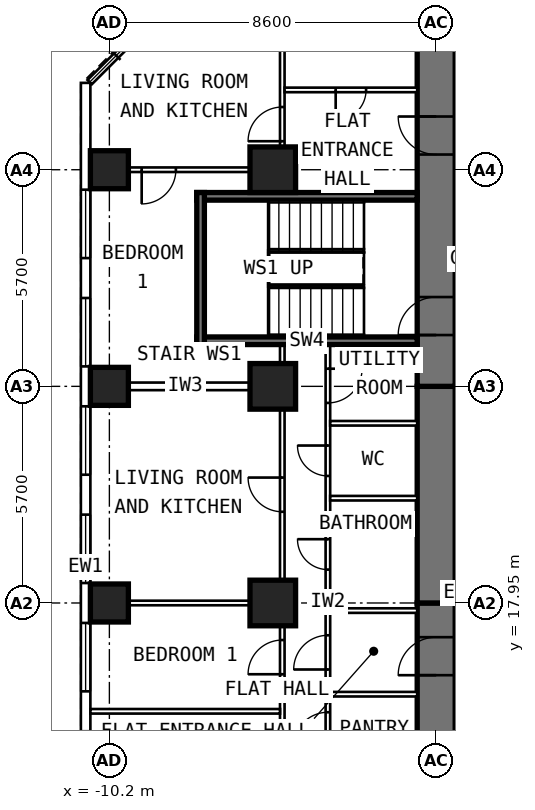
"""IFC4 building model, lengths in metres.
Left out: names, types, materials, properties, quantities, classifications, styles, units other than length and angle.
Written with IfcOpenShell. Run it as: python <this file> out.ifc"""

import sys

from ifc_helpers import new_model, si_unit, direction, frame, frame_2d, origin, origin_2d, place, context, subcontext, project, spatial, rectangle, extrude, element, fill, save


model = new_model("IFC4")
c1 = context("Model", 3, precision=1e-05, world=origin(), true_north=direction((0.0, 1.0)))
c2 = subcontext(c1, "Body", "Model", "MODEL_VIEW")
j1 = project(units=[si_unit("LENGTHUNIT", "METRE"), si_unit("PLANEANGLEUNIT", "RADIAN")], contexts=[c1])
p1 = place(None, origin())
s1 = spatial("IfcSite", under=j1, at=p1, CompositionType="ELEMENT")
p2 = place(p1, origin())
s2 = spatial("IfcBuilding", under=s1, at=p2, CompositionType="ELEMENT")
p3 = place(p2, frame((0.0, 0.0, 50.2)))
s3 = spatial("IfcBuildingStorey", under=s2, at=p3, CompositionType="ELEMENT", Elevation=50.2)
for number, where, z_axis, x_axis in (
    (1, (-10.2, 17.95, 0.0), (0.0, 0.0, 1.0), (0.0, 1.0, 0.0)),
    (2, (-10.2, 23.65, 0.0), (0.0, 0.0, 1.0), (0.0, 1.0, 0.0)),
    (3, (-10.2, 29.35, 0.0), (0.0, 0.0, 1.0), (0.0, 1.0, 0.0)),
):
    element("IfcColumn", number, at=place(p3, frame(where, z_axis=z_axis, x_axis=x_axis)), inside=s3, PredefinedType="COLUMN", context=c2, shape_type="SweptSolid", body=[
        extrude(rectangle(XDim=1.0, YDim=1.0, at=origin_2d()), origin(), (0.0, 0.0, 1.0), 3.6),
    ])
for number, where, z_axis, x_axis in (
    (4, (-5.9, 17.95, 0.0), (0.0, 0.0, 1.0), (0.0, 1.0, 0.0)),
    (5, (-5.9, 23.65, 0.0), (0.0, 0.0, 1.0), (0.0, 1.0, 0.0)),
    (6, (-5.9, 29.35, 0.0), (0.0, 0.0, 1.0), (0.0, 1.0, 0.0)),
):
    element("IfcColumn", number, at=place(p3, frame(where, z_axis=z_axis, x_axis=x_axis)), inside=s3, PredefinedType="COLUMN", context=c2, shape_type="SweptSolid", body=[
        extrude(rectangle(XDim=1.2, YDim=1.2, at=origin_2d()), origin(), (0.0, 0.0, 1.0), 3.6),
    ])
p4 = place(p3, frame((-1.6, 9.6, 0.0), z_axis=(0.0, 0.0, 1.0), x_axis=(0.0, 1.0, 0.0)))
e7 = element("IfcWall", 7, at=p4, inside=s3, PredefinedType="SHEAR", context=c2, shape_type="SweptSolid", body=[
    extrude(rectangle(XDim=8.35, YDim=1.0, at=frame_2d((4.175, 0.0))), origin(), (0.0, 0.0, 1.0), 3.6),
])
p5 = place(p4, frame((6.45, 0.0, 0.0)))
e8 = element("IfcOpeningElement", 8, at=p5, cuts=e7, PredefinedType="OPENING", context=c2, shape_type="SweptSolid", body=[
    extrude(rectangle(XDim=1.0, YDim=2.1, at=frame_2d((0.5, 1.05))), frame((0.0, 0.512, 0.0), z_axis=(0.0, -1.0, 0.0), x_axis=(1.0, 0.0, 0.0)), (0.0, 0.0, 1.0), 1.024),
])
p6 = place(p3, frame((-1.6, 17.95, 0.0), z_axis=(0.0, 0.0, 1.0), x_axis=(0.0, 1.0, 0.0)))
e9 = element("IfcWall", 9, at=p6, inside=s3, PredefinedType="SHEAR", context=c2, shape_type="SweptSolid", body=[
    extrude(rectangle(XDim=5.7, YDim=1.0, at=frame_2d((2.85, 0.0))), origin(), (0.0, 0.0, 1.0), 3.6),
])
p7 = place(p3, frame((-1.6, 23.65, 0.0), z_axis=(0.0, 0.0, 1.0), x_axis=(0.0, 1.0, 0.0)))
e10 = element("IfcWall", 10, at=p7, inside=s3, PredefinedType="SHEAR", context=c2, shape_type="SweptSolid", body=[
    extrude(rectangle(XDim=10.745, YDim=1.0, at=frame_2d((5.373, 0.0))), origin(), (0.0, 0.0, 1.0), 3.6),
])
p8 = place(p7, frame((6.1, 0.0, 0.0)))
e11 = element("IfcOpeningElement", 11, at=p8, cuts=e10, PredefinedType="OPENING", context=c2, shape_type="SweptSolid", body=[
    extrude(rectangle(XDim=1.0, YDim=2.1, at=frame_2d((0.5, 1.05))), frame((0.0, 0.512, 0.0), z_axis=(0.0, -1.0, 0.0), x_axis=(1.0, 0.0, 0.0)), (0.0, 0.0, 1.0), 1.024),
])
p9 = place(p7, frame((1.35, 0.0, 0.0)))
e12 = element("IfcOpeningElement", 12, at=p9, cuts=e10, PredefinedType="OPENING", context=c2, shape_type="SweptSolid", body=[
    extrude(rectangle(XDim=1.0, YDim=2.1, at=frame_2d((0.5, 1.05))), frame((0.0, 0.512, 0.0), z_axis=(0.0, -1.0, 0.0), x_axis=(1.0, 0.0, 0.0)), (0.0, 0.0, 1.0), 1.024),
])
p10 = place(p3, frame((-10.825, 6.148, 0.0), z_axis=(0.0, 0.0, 1.0), x_axis=(0.0, 1.0, 0.0)))
e13 = element("IfcWall", 13, at=p10, inside=s3, PredefinedType="SOLIDWALL", context=c2, shape_type="SweptSolid", body=[
    extrude(rectangle(XDim=25.487, YDim=0.25, at=frame_2d((12.744, 0.0))), origin(), (0.0, 0.0, 1.0), 3.35),
])
p11 = place(p10, frame((0.927, 0.0, 0.8)))
e14 = element("IfcOpeningElement", 14, at=p11, cuts=e13, PredefinedType="OPENING", context=c2, shape_type="SweptSolid", body=[
    extrude(rectangle(XDim=1.8, YDim=1.8, at=frame_2d((0.9, 0.9))), frame((0.0, 0.137, 0.0), z_axis=(0.0, -1.0, 0.0), x_axis=(1.0, 0.0, 0.0)), (0.0, 0.0, 1.0), 0.274),
])
p12 = place(p10, frame((3.777, 0.0, 0.8)))
e15 = element("IfcOpeningElement", 15, at=p12, cuts=e13, PredefinedType="OPENING", context=c2, shape_type="SweptSolid", body=[
    extrude(rectangle(XDim=1.8, YDim=1.8, at=frame_2d((0.9, 0.9))), frame((0.0, 0.137, 0.0), z_axis=(0.0, -1.0, 0.0), x_axis=(1.0, 0.0, 0.0)), (0.0, 0.0, 1.0), 0.274),
])
p13 = place(p10, frame((6.627, 0.0, 0.8)))
e16 = element("IfcOpeningElement", 16, at=p13, cuts=e13, PredefinedType="OPENING", context=c2, shape_type="SweptSolid", body=[
    extrude(rectangle(XDim=1.8, YDim=1.8, at=frame_2d((0.9, 0.9))), frame((0.0, 0.137, 0.0), z_axis=(0.0, -1.0, 0.0), x_axis=(1.0, 0.0, 0.0)), (0.0, 0.0, 1.0), 0.274),
])
p14 = place(p10, frame((9.477, 0.0, 0.8)))
e17 = element("IfcOpeningElement", 17, at=p14, cuts=e13, PredefinedType="OPENING", context=c2, shape_type="SweptSolid", body=[
    extrude(rectangle(XDim=1.8, YDim=1.8, at=frame_2d((0.9, 0.9))), frame((0.0, 0.137, 0.0), z_axis=(0.0, -1.0, 0.0), x_axis=(1.0, 0.0, 0.0)), (0.0, 0.0, 1.0), 0.274),
])
p15 = place(p10, frame((12.327, 0.0, 0.8)))
e18 = element("IfcOpeningElement", 18, at=p15, cuts=e13, PredefinedType="OPENING", context=c2, shape_type="SweptSolid", body=[
    extrude(rectangle(XDim=1.8, YDim=1.8, at=frame_2d((0.9, 0.9))), frame((0.0, 0.137, 0.0), z_axis=(0.0, -1.0, 0.0), x_axis=(1.0, 0.0, 0.0)), (0.0, 0.0, 1.0), 0.274),
])
p16 = place(p10, frame((15.177, 0.0, 0.8)))
e19 = element("IfcOpeningElement", 19, at=p16, cuts=e13, PredefinedType="OPENING", context=c2, shape_type="SweptSolid", body=[
    extrude(rectangle(XDim=1.8, YDim=1.8, at=frame_2d((0.9, 0.9))), frame((0.0, 0.137, 0.0), z_axis=(0.0, -1.0, 0.0), x_axis=(1.0, 0.0, 0.0)), (0.0, 0.0, 1.0), 0.274),
])
p17 = place(p10, frame((18.027, 0.0, 0.8)))
e20 = element("IfcOpeningElement", 20, at=p17, cuts=e13, PredefinedType="OPENING", context=c2, shape_type="SweptSolid", body=[
    extrude(rectangle(XDim=1.8, YDim=1.8, at=frame_2d((0.9, 0.9))), frame((0.0, 0.137, 0.0), z_axis=(0.0, -1.0, 0.0), x_axis=(1.0, 0.0, 0.0)), (0.0, 0.0, 1.0), 0.274),
])
p18 = place(p10, frame((20.877, 0.0, 0.8)))
e21 = element("IfcOpeningElement", 21, at=p18, cuts=e13, PredefinedType="OPENING", context=c2, shape_type="SweptSolid", body=[
    extrude(rectangle(XDim=1.8, YDim=1.8, at=frame_2d((0.9, 0.9))), frame((0.0, 0.137, 0.0), z_axis=(0.0, -1.0, 0.0), x_axis=(1.0, 0.0, 0.0)), (0.0, 0.0, 1.0), 0.274),
])
p19 = place(p3, frame((-4.45, 10.1, 0.0), z_axis=(0.0, 0.0, 1.0), x_axis=(0.0, 1.0, 0.0)))
e22 = element("IfcWall", 22, at=p19, inside=s3, PredefinedType="PARTITIONING", context=c2, shape_type="SweptSolid", body=[
    extrude(rectangle(XDim=14.65, YDim=0.12, at=frame_2d((7.325, 0.0))), origin(), (0.0, 0.0, 1.0), 3.35),
])
p20 = place(p19, frame((0.375, 0.0, 0.0)))
e23 = element("IfcOpeningElement", 23, at=p20, cuts=e22, PredefinedType="OPENING", context=c2, shape_type="SweptSolid", body=[
    extrude(rectangle(XDim=0.9, YDim=2.1, at=frame_2d((0.45, 1.05))), frame((0.0, 0.072, 0.0), z_axis=(0.0, -1.0, 0.0), x_axis=(1.0, 0.0, 0.0)), (0.0, 0.0, 1.0), 0.144),
])
p21 = place(p19, frame((2.275, 0.0, 0.0)))
e24 = element("IfcOpeningElement", 24, at=p21, cuts=e22, PredefinedType="OPENING", context=c2, shape_type="SweptSolid", body=[
    extrude(rectangle(XDim=0.8, YDim=2.1, at=frame_2d((0.4, 1.05))), frame((0.0, 0.072, 0.0), z_axis=(0.0, -1.0, 0.0), x_axis=(1.0, 0.0, 0.0)), (0.0, 0.0, 1.0), 0.144),
])
p22 = place(p19, frame((4.075, 0.0, 0.0)))
e25 = element("IfcOpeningElement", 25, at=p22, cuts=e22, PredefinedType="OPENING", context=c2, shape_type="SweptSolid", body=[
    extrude(rectangle(XDim=0.9, YDim=2.1, at=frame_2d((0.45, 1.05))), frame((0.0, 0.072, 0.0), z_axis=(0.0, -1.0, 0.0), x_axis=(1.0, 0.0, 0.0)), (0.0, 0.0, 1.0), 0.144),
])
p23 = place(p19, frame((6.1, 0.0, 0.0)))
e26 = element("IfcOpeningElement", 26, at=p23, cuts=e22, PredefinedType="OPENING", context=c2, shape_type="SweptSolid", body=[
    extrude(rectangle(XDim=0.9, YDim=2.1, at=frame_2d((0.45, 1.05))), frame((0.0, 0.072, 0.0), z_axis=(0.0, -1.0, 0.0), x_axis=(1.0, 0.0, 0.0)), (0.0, 0.0, 1.0), 0.144),
])
p24 = place(p19, frame((8.729, 0.0, 0.0)))
e27 = element("IfcOpeningElement", 27, at=p24, cuts=e22, PredefinedType="OPENING", context=c2, shape_type="SweptSolid", body=[
    extrude(rectangle(XDim=0.8, YDim=2.1, at=frame_2d((0.4, 1.05))), frame((0.0, 0.072, 0.0), z_axis=(0.0, -1.0, 0.0), x_axis=(1.0, 0.0, 0.0)), (0.0, 0.0, 1.0), 0.144),
])
p25 = place(p19, frame((11.193, 0.0, 0.0)))
e28 = element("IfcOpeningElement", 28, at=p25, cuts=e22, PredefinedType="OPENING", context=c2, shape_type="SweptSolid", body=[
    extrude(rectangle(XDim=0.8, YDim=2.1, at=frame_2d((0.4, 1.05))), frame((0.0, 0.072, 0.0), z_axis=(0.0, -1.0, 0.0), x_axis=(1.0, 0.0, 0.0)), (0.0, 0.0, 1.0), 0.144),
])
p26 = place(p19, frame((13.114, 0.0, 0.0)))
e29 = element("IfcOpeningElement", 29, at=p26, cuts=e22, PredefinedType="OPENING", context=c2, shape_type="SweptSolid", body=[
    extrude(rectangle(XDim=0.9, YDim=2.1, at=frame_2d((0.45, 1.05))), frame((0.0, 0.072, 0.0), z_axis=(0.0, -1.0, 0.0), x_axis=(1.0, 0.0, 0.0)), (0.0, 0.0, 1.0), 0.144),
])
p27 = place(p3, frame((-5.65, 9.6, 0.0), z_axis=(0.0, 0.0, 1.0), x_axis=(0.0, 1.0, 0.0)))
e30 = element("IfcWall", 30, at=p27, inside=s3, PredefinedType="PARTITIONING", context=c2, shape_type="SweptSolid", body=[
    extrude(rectangle(XDim=15.15, YDim=0.12, at=frame_2d((7.575, 0.0))), origin(), (0.0, 0.0, 1.0), 3.35),
])
p28 = place(p27, frame((1.0, 0.0, 0.0)))
e31 = element("IfcOpeningElement", 31, at=p28, cuts=e30, PredefinedType="OPENING", context=c2, shape_type="SweptSolid", body=[
    extrude(rectangle(XDim=0.9, YDim=2.1, at=frame_2d((0.45, 1.05))), frame((0.0, 0.072, 0.0), z_axis=(0.0, -1.0, 0.0), x_axis=(1.0, 0.0, 0.0)), (0.0, 0.0, 1.0), 0.144),
])
p29 = place(p27, frame((3.625, 0.0, 0.0)))
e32 = element("IfcOpeningElement", 32, at=p29, cuts=e30, PredefinedType="OPENING", context=c2, shape_type="SweptSolid", body=[
    extrude(rectangle(XDim=0.9, YDim=2.1, at=frame_2d((0.45, 1.05))), frame((0.0, 0.072, 0.0), z_axis=(0.0, -1.0, 0.0), x_axis=(1.0, 0.0, 0.0)), (0.0, 0.0, 1.0), 0.144),
])
p30 = place(p27, frame((6.475, 0.0, 0.0)))
e33 = element("IfcOpeningElement", 33, at=p30, cuts=e30, PredefinedType="OPENING", context=c2, shape_type="SweptSolid", body=[
    extrude(rectangle(XDim=0.9, YDim=2.1, at=frame_2d((0.45, 1.05))), frame((0.0, 0.072, 0.0), z_axis=(0.0, -1.0, 0.0), x_axis=(1.0, 0.0, 0.0)), (0.0, 0.0, 1.0), 0.144),
])
p31 = place(p27, frame((10.75, 0.0, 0.0)))
e34 = element("IfcOpeningElement", 34, at=p31, cuts=e30, PredefinedType="OPENING", context=c2, shape_type="SweptSolid", body=[
    extrude(rectangle(XDim=0.9, YDim=2.1, at=frame_2d((0.45, 1.05))), frame((0.0, 0.072, 0.0), z_axis=(0.0, -1.0, 0.0), x_axis=(1.0, 0.0, 0.0)), (0.0, 0.0, 1.0), 0.144),
])
p32 = place(p3, frame((-5.71, 15.1, 0.0), z_axis=(0.0, 0.0, 1.0), x_axis=(-1.0, 0.0, 0.0)))
e35 = element("IfcWall", 35, at=p32, inside=s3, PredefinedType="PARTITIONING", context=c2, shape_type="SweptSolid", body=[
    extrude(rectangle(XDim=4.99, YDim=0.12, at=frame_2d((2.495, 0.0))), origin(), (0.0, 0.0, 1.0), 3.35),
])
p33 = place(p3, frame((-5.71, 17.95, 0.0), z_axis=(0.0, 0.0, 1.0), x_axis=(-1.0, 0.0, 0.0)))
e36 = element("IfcWall", 36, at=p33, inside=s3, PredefinedType="PARTITIONING", context=c2, shape_type="SweptSolid", body=[
    extrude(rectangle(XDim=4.99, YDim=0.12, at=frame_2d((2.495, 0.0))), origin(), (0.0, 0.0, 1.0), 2.45),
])
p34 = place(p3, frame((-2.1, 15.55, 0.0), z_axis=(0.0, 0.0, 1.0), x_axis=(-1.0, 0.0, 0.0)))
e37 = element("IfcWall", 37, at=p34, inside=s3, PredefinedType="PARTITIONING", context=c2, shape_type="SweptSolid", body=[
    extrude(rectangle(XDim=2.29, YDim=0.12, at=frame_2d((1.145, 0.0))), origin(), (0.0, 0.0, 1.0), 3.35),
])
p35 = place(p3, frame((-2.1, 17.75, 0.0), z_axis=(0.0, 0.0, 1.0), x_axis=(-1.0, 0.0, 0.0)))
e38 = element("IfcWall", 38, at=p35, inside=s3, PredefinedType="PARTITIONING", context=c2, shape_type="SweptSolid", body=[
    extrude(rectangle(XDim=2.29, YDim=0.12, at=frame_2d((1.145, 0.0))), origin(), (0.0, 0.0, 1.0), 2.45),
])
for number, where, z_axis, x_axis in (
    (39, (-2.1, 20.707, 0.0), (0.0, 0.0, 1.0), (-1.0, 0.0, 0.0)),
    (40, (-2.1, 22.678, 0.0), (0.0, 0.0, 1.0), (-1.0, 0.0, 0.0)),
):
    element("IfcWall", number, at=place(p3, frame(where, z_axis=z_axis, x_axis=x_axis)), inside=s3, PredefinedType="PARTITIONING", context=c2, shape_type="SweptSolid", body=[
        extrude(rectangle(XDim=2.29, YDim=0.12, at=frame_2d((1.145, 0.0))), origin(), (0.0, 0.0, 1.0), 3.35),
    ])
p36 = place(p3, frame((-5.71, 23.65, 0.0), z_axis=(0.0, 0.0, 1.0), x_axis=(-1.0, 0.0, 0.0)))
e41 = element("IfcWall", 41, at=p36, inside=s3, PredefinedType="PARTITIONING", context=c2, shape_type="SweptSolid", body=[
    extrude(rectangle(XDim=4.99, YDim=0.2, at=frame_2d((2.495, 0.0))), origin(), (0.0, 0.0, 1.0), 2.45),
])
p37 = place(p3, frame((-5.71, 29.35, 0.0), z_axis=(0.0, 0.0, 1.0), x_axis=(-1.0, 0.0, 0.0)))
e42 = element("IfcWall", 42, at=p37, inside=s3, PredefinedType="PARTITIONING", context=c2, shape_type="SweptSolid", body=[
    extrude(rectangle(XDim=4.99, YDim=0.12, at=frame_2d((2.495, 0.0))), origin(), (0.0, 0.0, 1.0), 2.45),
])
p38 = place(p37, frame((2.74, 0.0, 0.0)))
e43 = element("IfcOpeningElement", 43, at=p38, cuts=e42, PredefinedType="OPENING", context=c2, shape_type="SweptSolid", body=[
    extrude(rectangle(XDim=0.9, YDim=2.1, at=frame_2d((0.45, 1.05))), frame((0.0, 0.072, 0.0), z_axis=(0.0, -1.0, 0.0), x_axis=(1.0, 0.0, 0.0)), (0.0, 0.0, 1.0), 0.144),
])
p39 = place(p3, frame((-5.65, 28.95, 0.0), z_axis=(0.0, 0.0, 1.0), x_axis=(0.0, 1.0, 0.0)))
e44 = element("IfcWall", 44, at=p39, inside=s3, PredefinedType="PARTITIONING", context=c2, shape_type="SweptSolid", body=[
    extrude(rectangle(XDim=5.445, YDim=0.12, at=frame_2d((2.723, 0.0))), origin(), (0.0, 0.0, 1.0), 3.35),
])
p40 = place(p39, frame((1.15, 0.0, 0.0)))
e45 = element("IfcOpeningElement", 45, at=p40, cuts=e44, PredefinedType="OPENING", context=c2, shape_type="SweptSolid", body=[
    extrude(rectangle(XDim=0.9, YDim=2.1, at=frame_2d((0.45, 1.05))), frame((0.0, 0.072, 0.0), z_axis=(0.0, -1.0, 0.0), x_axis=(1.0, 0.0, 0.0)), (0.0, 0.0, 1.0), 0.144),
])
p41 = place(p3, frame((-2.1, 31.45, 0.0), z_axis=(0.0, 0.0, 1.0), x_axis=(-1.0, 0.0, 0.0)))
e46 = element("IfcWall", 46, at=p41, inside=s3, PredefinedType="PARTITIONING", context=c2, shape_type="SweptSolid", body=[
    extrude(rectangle(XDim=3.49, YDim=0.12, at=frame_2d((1.745, 0.0))), origin(), (0.0, 0.0, 1.0), 3.35),
])
p42 = place(p41, frame((1.345, 0.0, 0.0)))
e47 = element("IfcOpeningElement", 47, at=p42, cuts=e46, PredefinedType="OPENING", context=c2, shape_type="SweptSolid", body=[
    extrude(rectangle(XDim=0.8, YDim=2.1, at=frame_2d((0.4, 1.05))), frame((0.0, 0.072, 0.0), z_axis=(0.0, -1.0, 0.0), x_axis=(1.0, 0.0, 0.0)), (0.0, 0.0, 1.0), 0.144),
])
for number, where, z_axis, x_axis in (
    (48, (-2.1, 24.85, 0.0), (0.0, 0.0, 1.0), (-1.0, 0.0, 0.0)),
    (49, (-2.1, 28.65, 0.0), (0.0, 0.0, 1.0), (-1.0, 0.0, 0.0)),
):
    element("IfcWall", number, at=place(p3, frame(where, z_axis=z_axis, x_axis=x_axis)), inside=s3, PredefinedType="SHEAR", context=c2, shape_type="SweptSolid", body=[
        extrude(rectangle(XDim=5.8, YDim=0.2, at=frame_2d((2.9, 0.0))), origin(), (0.0, 0.0, 1.0), 3.33),
    ])
p43 = place(p3, frame((-7.8, 24.75, 0.0), z_axis=(0.0, 0.0, 1.0), x_axis=(0.0, 1.0, 0.0)))
e50 = element("IfcWall", 50, at=p43, inside=s3, PredefinedType="SHEAR", context=c2, shape_type="SweptSolid", body=[
    extrude(rectangle(XDim=4.0, YDim=0.2, at=frame_2d((2.0, 0.0))), origin(), (0.0, 0.0, 1.0), 3.33),
])
p44 = place(p14, origin())
e51 = element("IfcWindow", 51, at=p44, inside=s3, PartitioningType="SINGLE_PANEL", PredefinedType="WINDOW", context=c2, shape_type="SweptSolid", body=[
    extrude(rectangle(XDim=1.8, YDim=1.8, at=frame_2d((0.9, 0.9))), frame((0.0, 0.03, 0.0), z_axis=(0.0, -1.0, 0.0), x_axis=(1.0, 0.0, 0.0)), (0.0, 0.0, 1.0), 0.06),
])
fill(e17, e51)
p45 = place(p15, origin())
e52 = element("IfcWindow", 52, at=p45, inside=s3, PartitioningType="SINGLE_PANEL", PredefinedType="WINDOW", context=c2, shape_type="SweptSolid", body=[
    extrude(rectangle(XDim=1.8, YDim=1.8, at=frame_2d((0.9, 0.9))), frame((0.0, 0.03, 0.0), z_axis=(0.0, -1.0, 0.0), x_axis=(1.0, 0.0, 0.0)), (0.0, 0.0, 1.0), 0.06),
])
fill(e18, e52)
p46 = place(p16, origin())
e53 = element("IfcWindow", 53, at=p46, inside=s3, PartitioningType="SINGLE_PANEL", PredefinedType="WINDOW", context=c2, shape_type="SweptSolid", body=[
    extrude(rectangle(XDim=1.8, YDim=1.8, at=frame_2d((0.9, 0.9))), frame((0.0, 0.03, 0.0), z_axis=(0.0, -1.0, 0.0), x_axis=(1.0, 0.0, 0.0)), (0.0, 0.0, 1.0), 0.06),
])
fill(e19, e53)
p47 = place(p17, origin())
e54 = element("IfcWindow", 54, at=p47, inside=s3, PartitioningType="SINGLE_PANEL", PredefinedType="WINDOW", context=c2, shape_type="SweptSolid", body=[
    extrude(rectangle(XDim=1.8, YDim=1.8, at=frame_2d((0.9, 0.9))), frame((0.0, 0.03, 0.0), z_axis=(0.0, -1.0, 0.0), x_axis=(1.0, 0.0, 0.0)), (0.0, 0.0, 1.0), 0.06),
])
fill(e20, e54)
p48 = place(p18, origin())
e55 = element("IfcWindow", 55, at=p48, inside=s3, PartitioningType="SINGLE_PANEL", PredefinedType="WINDOW", context=c2, shape_type="SweptSolid", body=[
    extrude(rectangle(XDim=1.8, YDim=1.8, at=frame_2d((0.9, 0.9))), frame((0.0, 0.03, 0.0), z_axis=(0.0, -1.0, 0.0), x_axis=(1.0, 0.0, 0.0)), (0.0, 0.0, 1.0), 0.06),
])
fill(e21, e55)
p49 = place(p5, origin())
e56 = element("IfcDoor", 56, at=p49, inside=s3, OperationType="SINGLE_SWING_LEFT", PredefinedType="DOOR", context=c2, shape_type="SweptSolid", body=[
    extrude(rectangle(XDim=1.0, YDim=2.1, at=frame_2d((0.5, 1.05))), frame((0.0, 0.25, 0.0), z_axis=(0.0, -1.0, 0.0), x_axis=(1.0, 0.0, 0.0)), (0.0, 0.0, 1.0), 0.5),
])
fill(e8, e56)
p50 = place(p30, origin())
e57 = element("IfcDoor", 57, at=p50, inside=s3, OperationType="SINGLE_SWING_LEFT", PredefinedType="DOOR", context=c2, shape_type="SweptSolid", body=[
    extrude(rectangle(XDim=0.9, YDim=2.1, at=frame_2d((0.45, 1.05))), frame((0.0, 0.025, 0.0), z_axis=(0.0, -1.0, 0.0), x_axis=(1.0, 0.0, 0.0)), (0.0, 0.0, 1.0), 0.05),
])
fill(e33, e57)
p51 = place(p31, origin())
e58 = element("IfcDoor", 58, at=p51, inside=s3, OperationType="SINGLE_SWING_RIGHT", PredefinedType="DOOR", context=c2, shape_type="SweptSolid", body=[
    extrude(rectangle(XDim=0.9, YDim=2.1, at=frame_2d((0.45, 1.05))), frame((0.0, 0.025, 0.0), z_axis=(0.0, -1.0, 0.0), x_axis=(1.0, 0.0, 0.0)), (0.0, 0.0, 1.0), 0.05),
])
fill(e34, e58)
p52 = place(p22, origin())
e59 = element("IfcDoor", 59, at=p52, inside=s3, OperationType="SINGLE_SWING_LEFT", PredefinedType="DOOR", context=c2, shape_type="SweptSolid", body=[
    extrude(rectangle(XDim=0.9, YDim=2.1, at=frame_2d((0.45, 1.05))), frame((0.0, 0.025, 0.0), z_axis=(0.0, -1.0, 0.0), x_axis=(1.0, 0.0, 0.0)), (0.0, 0.0, 1.0), 0.05),
])
fill(e25, e59)
p53 = place(p23, origin())
e60 = element("IfcDoor", 60, at=p53, inside=s3, OperationType="SINGLE_SWING_LEFT", PredefinedType="DOOR", context=c2, shape_type="SweptSolid", body=[
    extrude(rectangle(XDim=0.9, YDim=2.1, at=frame_2d((0.45, 1.05))), frame((0.0, 0.025, 0.0), z_axis=(0.0, -1.0, 0.0), x_axis=(1.0, 0.0, 0.0)), (0.0, 0.0, 1.0), 0.05),
])
fill(e26, e60)
p54 = place(p24, origin())
e61 = element("IfcDoor", 61, at=p54, inside=s3, OperationType="SINGLE_SWING_RIGHT", PredefinedType="DOOR", context=c2, shape_type="SweptSolid", body=[
    extrude(rectangle(XDim=0.8, YDim=2.1, at=frame_2d((0.4, 1.05))), frame((0.0, 0.025, 0.0), z_axis=(0.0, -1.0, 0.0), x_axis=(1.0, 0.0, 0.0)), (0.0, 0.0, 1.0), 0.05),
])
fill(e27, e61)
p55 = place(p25, origin())
e62 = element("IfcDoor", 62, at=p55, inside=s3, OperationType="SINGLE_SWING_RIGHT", PredefinedType="DOOR", context=c2, shape_type="SweptSolid", body=[
    extrude(rectangle(XDim=0.8, YDim=2.1, at=frame_2d((0.4, 1.05))), frame((0.0, 0.025, 0.0), z_axis=(0.0, -1.0, 0.0), x_axis=(1.0, 0.0, 0.0)), (0.0, 0.0, 1.0), 0.05),
])
fill(e28, e62)
p56 = place(p26, frame((0.9, 0.0, 0.0), z_axis=(0.0, 0.0, 1.0), x_axis=(-1.0, 0.0, 0.0)))
e63 = element("IfcDoor", 63, at=p56, inside=s3, OperationType="SINGLE_SWING_LEFT", PredefinedType="DOOR", context=c2, shape_type="SweptSolid", body=[
    extrude(rectangle(XDim=0.9, YDim=2.1, at=frame_2d((0.45, 1.05))), frame((0.0, 0.025, 0.0), z_axis=(0.0, -1.0, 0.0), x_axis=(1.0, 0.0, 0.0)), (0.0, 0.0, 1.0), 0.05),
])
fill(e29, e63)
p57 = place(p38, origin())
e64 = element("IfcDoor", 64, at=p57, inside=s3, OperationType="SINGLE_SWING_RIGHT", PredefinedType="DOOR", context=c2, shape_type="SweptSolid", body=[
    extrude(rectangle(XDim=0.9, YDim=2.1, at=frame_2d((0.45, 1.05))), frame((0.0, 0.025, 0.0), z_axis=(0.0, -1.0, 0.0), x_axis=(1.0, 0.0, 0.0)), (0.0, 0.0, 1.0), 0.05),
])
fill(e43, e64)
p58 = place(p40, origin())
e65 = element("IfcDoor", 65, at=p58, inside=s3, OperationType="SINGLE_SWING_LEFT", PredefinedType="DOOR", context=c2, shape_type="SweptSolid", body=[
    extrude(rectangle(XDim=0.9, YDim=2.1, at=frame_2d((0.45, 1.05))), frame((0.0, 0.025, 0.0), z_axis=(0.0, -1.0, 0.0), x_axis=(1.0, 0.0, 0.0)), (0.0, 0.0, 1.0), 0.05),
])
fill(e45, e65)
p59 = place(p42, origin())
e66 = element("IfcDoor", 66, at=p59, inside=s3, OperationType="SINGLE_SWING_RIGHT", PredefinedType="DOOR", context=c2, shape_type="SweptSolid", body=[
    extrude(rectangle(XDim=0.8, YDim=2.1, at=frame_2d((0.4, 1.05))), frame((0.0, 0.025, 0.0), z_axis=(0.0, -1.0, 0.0), x_axis=(1.0, 0.0, 0.0)), (0.0, 0.0, 1.0), 0.05),
])
fill(e47, e66)
p60 = place(p8, origin())
e67 = element("IfcDoor", 67, at=p60, inside=s3, OperationType="SINGLE_SWING_RIGHT", PredefinedType="DOOR", context=c2, shape_type="SweptSolid", body=[
    extrude(rectangle(XDim=1.0, YDim=2.1, at=frame_2d((0.5, 1.05))), frame((0.0, 0.25, 0.0), z_axis=(0.0, -1.0, 0.0), x_axis=(1.0, 0.0, 0.0)), (0.0, 0.0, 1.0), 0.5),
])
fill(e11, e67)
p61 = place(p9, origin())
e68 = element("IfcDoor", 68, at=p61, inside=s3, OperationType="SINGLE_SWING_LEFT", PredefinedType="DOOR", context=c2, shape_type="SweptSolid", body=[
    extrude(rectangle(XDim=1.0, YDim=2.1, at=frame_2d((0.5, 1.05))), frame((0.0, 0.25, 0.0), z_axis=(0.0, -1.0, 0.0), x_axis=(1.0, 0.0, 0.0)), (0.0, 0.0, 1.0), 0.5),
])
fill(e12, e68)
save(model, sys.argv[1])
